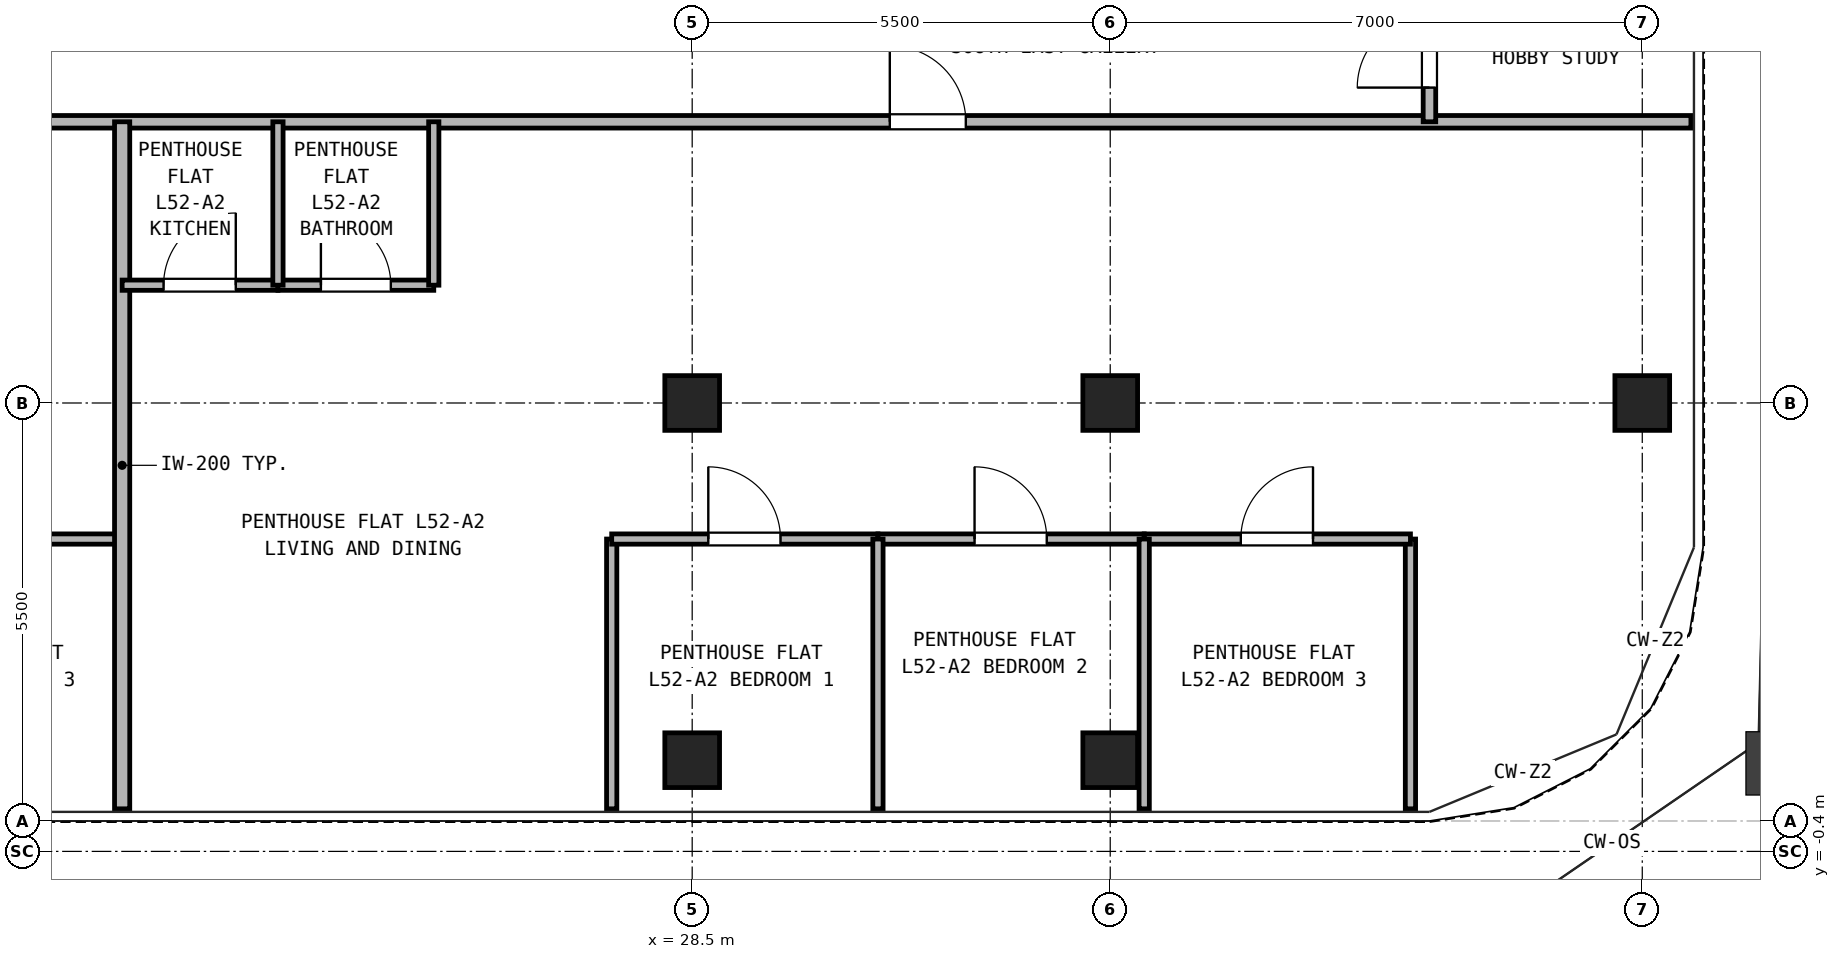
"""IFC4 building model, lengths in metres.
Left out: names, types, materials, properties, quantities, classifications, styles, units other than length and angle.
Written with IfcOpenShell. Run it as: python <this file> out.ifc"""

import sys

from ifc_helpers import new_model, si_unit, direction, frame, frame_2d, origin, origin_2d, place, context, subcontext, project, spatial, rectangle, hollow_rectangle, extrude, source, transform, mapped, element, fill, save


model = new_model("IFC4")
c1 = context("Model", 3, precision=1e-05, world=origin(), true_north=direction((0.0, 1.0)))
c2 = subcontext(c1, "Body", "Model", "MODEL_VIEW")
j1 = project(units=[si_unit("LENGTHUNIT", "METRE"), si_unit("PLANEANGLEUNIT", "RADIAN")], contexts=[c1])
p1 = place(None, origin())
s1 = spatial("IfcSite", under=j1, at=p1, CompositionType="ELEMENT")
p2 = place(p1, origin())
s2 = spatial("IfcBuilding", under=s1, at=p2, CompositionType="ELEMENT")
p3 = place(p2, frame((0.0, 0.0, 184.9)))
s3 = spatial("IfcBuildingStorey", under=s2, at=p3, CompositionType="ELEMENT", Elevation=184.9)
m1 = source(origin(), c2, "Body", "SweptSolid", [
    extrude(hollow_rectangle(XDim=0.72, YDim=0.72, WallThickness=0.04, at=origin_2d()), origin(), (0.0, 0.0, 1.0), 2.84),
])
for number, where, z_axis, x_axis in (
    (1, (28.5, 0.8, 0.0), (0.0, 0.0, 1.0), (1.0, 0.0, 0.0)),
    (2, (34.0, 0.8, 0.0), (0.0, 0.0, 1.0), (1.0, 0.0, 0.0)),
    (3, (41.0, 5.5, 0.0), (0.0, 0.0, 1.0), (1.0, 0.0, 0.0)),
    (4, (28.5, 5.5, 0.0), (0.0, 0.0, 1.0), (1.0, 0.0, 0.0)),
    (5, (34.0, 5.5, 0.0), (0.0, 0.0, 1.0), (1.0, 0.0, 0.0)),
):
    element("IfcColumn", number, at=place(p3, frame(where, z_axis=z_axis, x_axis=x_axis)), inside=s3, PredefinedType="COLUMN", context=c2, shape_type="MappedRepresentation", body=[
        mapped(m1, transform((0.0, 0.0, 0.0), x_axis=(1.0, 0.0, 0.0), y_axis=(0.0, 1.0, 0.0), z_axis=(0.0, 0.0, 1.0), scale=1.0)),
    ])
p4 = place(p3, frame((0.16, 9.2, 0.0), z_axis=(0.0, 0.0, 1.0), x_axis=(1.0, 0.0, 0.0)))
e6 = element("IfcWall", 6, at=p4, inside=s3, PredefinedType="PARTITIONING", context=c2, shape_type="SweptSolid", body=[
    extrude(rectangle(XDim=41.48, YDim=0.165, at=frame_2d((20.74, 0.0))), origin(), (0.0, 0.0, 1.0), 2.84),
])
p5 = place(p4, frame((15.565, 0.0, 0.0)))
e7 = element("IfcOpeningElement", 7, at=p5, cuts=e6, PredefinedType="OPENING", context=c2, shape_type="SweptSolid", body=[
    extrude(rectangle(XDim=1.0, YDim=2.15, at=frame_2d((0.5, 1.075))), frame((0.0, 0.093, 0.0), z_axis=(0.0, -1.0, 0.0), x_axis=(1.0, 0.0, 0.0)), (0.0, 0.0, 1.0), 0.185),
])
p6 = place(p4, frame((30.94, 0.0, 0.0)))
e8 = element("IfcOpeningElement", 8, at=p6, cuts=e6, PredefinedType="OPENING", context=c2, shape_type="SweptSolid", body=[
    extrude(rectangle(XDim=1.0, YDim=2.15, at=frame_2d((0.5, 1.075))), frame((0.0, 0.093, 0.0), z_axis=(0.0, -1.0, 0.0), x_axis=(1.0, 0.0, 0.0)), (0.0, 0.0, 1.0), 0.185),
])
p7 = place(p3, frame((38.2, 9.2, 0.0), z_axis=(0.0, 0.0, 1.0), x_axis=(0.0, 1.0, 0.0)))
e9 = element("IfcWall", 9, at=p7, inside=s3, PredefinedType="PARTITIONING", context=c2, shape_type="SweptSolid", body=[
    extrude(rectangle(XDim=2.0, YDim=0.165, at=frame_2d((1.0, 0.0))), origin(), (0.0, 0.0, 1.0), 2.84),
])
p8 = place(p7, frame((0.45, 0.0, 0.0)))
e10 = element("IfcOpeningElement", 10, at=p8, cuts=e9, PredefinedType="OPENING", context=c2, shape_type="SweptSolid", body=[
    extrude(rectangle(XDim=0.95, YDim=2.15, at=frame_2d((0.475, 1.075))), frame((0.0, 0.093, 0.0), z_axis=(0.0, -1.0, 0.0), x_axis=(1.0, 0.0, 0.0)), (0.0, 0.0, 1.0), 0.185),
])
p9 = place(p3, frame((17.456, 3.71, 0.0), z_axis=(0.0, 0.0, 1.0), x_axis=(1.0, 0.0, 0.0)))
e11 = element("IfcWall", 11, at=p9, inside=s3, PredefinedType="PARTITIONING", context=c2, shape_type="SweptSolid", body=[
    extrude(rectangle(XDim=3.544, YDim=0.135, at=frame_2d((1.772, 0.0))), origin(), (0.0, 0.0, 1.0), 2.84),
])
p10 = place(p9, frame((1.292, 0.0, 0.0)))
e12 = element("IfcOpeningElement", 12, at=p10, cuts=e11, PredefinedType="OPENING", context=c2, shape_type="SweptSolid", body=[
    extrude(rectangle(XDim=0.95, YDim=2.15, at=frame_2d((0.475, 1.075))), frame((0.0, 0.077, 0.0), z_axis=(0.0, -1.0, 0.0), x_axis=(1.0, 0.0, 0.0)), (0.0, 0.0, 1.0), 0.155),
])
p11 = place(p3, frame((21.0, 0.16, 0.0), z_axis=(0.0, 0.0, 1.0), x_axis=(0.0, 1.0, 0.0)))
e13 = element("IfcWall", 13, at=p11, inside=s3, PredefinedType="PARTITIONING", context=c2, shape_type="SweptSolid", body=[
    extrude(rectangle(XDim=9.04, YDim=0.2, at=frame_2d((4.52, 0.0))), origin(), (0.0, 0.0, 1.0), 2.84),
])
p12 = place(p3, frame((21.0, 7.05, 0.0), z_axis=(0.0, 0.0, 1.0), x_axis=(1.0, 0.0, 0.0)))
e14 = element("IfcWall", 14, at=p12, inside=s3, PredefinedType="PARTITIONING", context=c2, shape_type="SweptSolid", body=[
    extrude(rectangle(XDim=2.05, YDim=0.135, at=frame_2d((1.025, 0.0))), origin(), (0.0, 0.0, 1.0), 2.84),
])
p13 = place(p12, frame((0.545, 0.0, 0.0)))
e15 = element("IfcOpeningElement", 15, at=p13, cuts=e14, PredefinedType="OPENING", context=c2, shape_type="SweptSolid", body=[
    extrude(rectangle(XDim=0.95, YDim=2.15, at=frame_2d((0.475, 1.075))), frame((0.0, 0.077, 0.0), z_axis=(0.0, -1.0, 0.0), x_axis=(1.0, 0.0, 0.0)), (0.0, 0.0, 1.0), 0.155),
])
p14 = place(p3, frame((23.05, 7.05, 0.0), z_axis=(0.0, 0.0, 1.0), x_axis=(1.0, 0.0, 0.0)))
e16 = element("IfcWall", 16, at=p14, inside=s3, PredefinedType="PARTITIONING", context=c2, shape_type="SweptSolid", body=[
    extrude(rectangle(XDim=2.05, YDim=0.135, at=frame_2d((1.025, 0.0))), origin(), (0.0, 0.0, 1.0), 2.84),
])
p15 = place(p14, frame((0.565, 0.0, 0.0)))
e17 = element("IfcOpeningElement", 17, at=p15, cuts=e16, PredefinedType="OPENING", context=c2, shape_type="SweptSolid", body=[
    extrude(rectangle(XDim=0.92, YDim=2.1, at=frame_2d((0.46, 1.05))), frame((0.0, 0.077, 0.0), z_axis=(0.0, -1.0, 0.0), x_axis=(1.0, 0.0, 0.0)), (0.0, 0.0, 1.0), 0.155),
])
for number, where, z_axis, x_axis in (
    (18, (23.05, 7.05, 0.0), (0.0, 0.0, 1.0), (0.0, 1.0, 0.0)),
    (19, (25.1, 7.05, 0.0), (0.0, 0.0, 1.0), (0.0, 1.0, 0.0)),
):
    element("IfcWall", number, at=place(p3, frame(where, z_axis=z_axis, x_axis=x_axis)), inside=s3, PredefinedType="PARTITIONING", context=c2, shape_type="SweptSolid", body=[
        extrude(rectangle(XDim=2.15, YDim=0.135, at=frame_2d((1.075, 0.0))), origin(), (0.0, 0.0, 1.0), 2.84),
    ])
for number, where, z_axis, x_axis in (
    (20, (27.441, 0.16, 0.0), (0.0, 0.0, 1.0), (0.0, 1.0, 0.0)),
    (21, (37.95, 0.16, 0.0), (0.0, 0.0, 1.0), (0.0, 1.0, 0.0)),
):
    element("IfcWall", number, at=place(p3, frame(where, z_axis=z_axis, x_axis=x_axis)), inside=s3, PredefinedType="PARTITIONING", context=c2, shape_type="SweptSolid", body=[
        extrude(rectangle(XDim=3.55, YDim=0.135, at=frame_2d((1.775, 0.0))), origin(), (0.0, 0.0, 1.0), 2.84),
    ])
p16 = place(p3, frame((27.441, 3.71, 0.0), z_axis=(0.0, 0.0, 1.0), x_axis=(1.0, 0.0, 0.0)))
e22 = element("IfcWall", 22, at=p16, inside=s3, PredefinedType="PARTITIONING", context=c2, shape_type="SweptSolid", body=[
    extrude(rectangle(XDim=3.503, YDim=0.135, at=frame_2d((1.751, 0.0))), origin(), (0.0, 0.0, 1.0), 2.84),
])
p17 = place(p16, frame((1.271, 0.0, 0.0)))
e23 = element("IfcOpeningElement", 23, at=p17, cuts=e22, PredefinedType="OPENING", context=c2, shape_type="SweptSolid", body=[
    extrude(rectangle(XDim=0.95, YDim=2.15, at=frame_2d((0.475, 1.075))), frame((0.0, 0.077, 0.0), z_axis=(0.0, -1.0, 0.0), x_axis=(1.0, 0.0, 0.0)), (0.0, 0.0, 1.0), 0.155),
])
p18 = place(p3, frame((30.944, 3.71, 0.0), z_axis=(0.0, 0.0, 1.0), x_axis=(1.0, 0.0, 0.0)))
e24 = element("IfcWall", 24, at=p18, inside=s3, PredefinedType="PARTITIONING", context=c2, shape_type="SweptSolid", body=[
    extrude(rectangle(XDim=3.503, YDim=0.135, at=frame_2d((1.751, 0.0))), origin(), (0.0, 0.0, 1.0), 2.84),
])
p19 = place(p18, frame((1.271, 0.0, 0.0)))
e25 = element("IfcOpeningElement", 25, at=p19, cuts=e24, PredefinedType="OPENING", context=c2, shape_type="SweptSolid", body=[
    extrude(rectangle(XDim=0.95, YDim=2.15, at=frame_2d((0.475, 1.075))), frame((0.0, 0.077, 0.0), z_axis=(0.0, -1.0, 0.0), x_axis=(1.0, 0.0, 0.0)), (0.0, 0.0, 1.0), 0.155),
])
p20 = place(p3, frame((30.944, 0.16, 0.0), z_axis=(0.0, 0.0, 1.0), x_axis=(0.0, 1.0, 0.0)))
e26 = element("IfcWall", 26, at=p20, inside=s3, PredefinedType="PARTITIONING", context=c2, shape_type="SweptSolid", body=[
    extrude(rectangle(XDim=3.55, YDim=0.135, at=frame_2d((1.775, 0.0))), origin(), (0.0, 0.0, 1.0), 2.84),
])
p21 = place(p3, frame((34.447, 3.71, 0.0), z_axis=(0.0, 0.0, 1.0), x_axis=(1.0, 0.0, 0.0)))
e27 = element("IfcWall", 27, at=p21, inside=s3, PredefinedType="PARTITIONING", context=c2, shape_type="SweptSolid", body=[
    extrude(rectangle(XDim=3.503, YDim=0.135, at=frame_2d((1.751, 0.0))), origin(), (0.0, 0.0, 1.0), 2.84),
])
p22 = place(p21, frame((1.271, 0.0, 0.0)))
e28 = element("IfcOpeningElement", 28, at=p22, cuts=e27, PredefinedType="OPENING", context=c2, shape_type="SweptSolid", body=[
    extrude(rectangle(XDim=0.95, YDim=2.15, at=frame_2d((0.475, 1.075))), frame((0.0, 0.077, 0.0), z_axis=(0.0, -1.0, 0.0), x_axis=(1.0, 0.0, 0.0)), (0.0, 0.0, 1.0), 0.155),
])
p23 = place(p3, frame((34.447, 0.16, 0.0), z_axis=(0.0, 0.0, 1.0), x_axis=(0.0, 1.0, 0.0)))
e29 = element("IfcWall", 29, at=p23, inside=s3, PredefinedType="PARTITIONING", context=c2, shape_type="SweptSolid", body=[
    extrude(rectangle(XDim=3.55, YDim=0.135, at=frame_2d((1.775, 0.0))), origin(), (0.0, 0.0, 1.0), 2.84),
])
p24 = place(p13, origin())
e30 = element("IfcDoor", 30, at=p24, inside=s3, OperationType="SINGLE_SWING_RIGHT", PredefinedType="DOOR", context=c2, shape_type="SweptSolid", body=[
    extrude(rectangle(XDim=0.95, YDim=2.15, at=frame_2d((0.475, 1.075))), frame((0.0, 0.025, 0.0), z_axis=(0.0, -1.0, 0.0), x_axis=(1.0, 0.0, 0.0)), (0.0, 0.0, 1.0), 0.05),
])
fill(e15, e30)
p25 = place(p15, origin())
e31 = element("IfcDoor", 31, at=p25, inside=s3, OperationType="SINGLE_SWING_LEFT", PredefinedType="DOOR", context=c2, shape_type="SweptSolid", body=[
    extrude(rectangle(XDim=0.92, YDim=2.1, at=frame_2d((0.46, 1.05))), frame((0.0, 0.025, 0.0), z_axis=(0.0, -1.0, 0.0), x_axis=(1.0, 0.0, 0.0)), (0.0, 0.0, 1.0), 0.05),
])
fill(e17, e31)
p26 = place(p17, frame((0.95, 0.0, 0.0), z_axis=(0.0, 0.0, 1.0), x_axis=(-1.0, 0.0, 0.0)))
e32 = element("IfcDoor", 32, at=p26, inside=s3, OperationType="SINGLE_SWING_LEFT", PredefinedType="DOOR", context=c2, shape_type="SweptSolid", body=[
    extrude(rectangle(XDim=0.95, YDim=2.15, at=frame_2d((0.475, 1.075))), frame((0.0, 0.025, 0.0), z_axis=(0.0, -1.0, 0.0), x_axis=(1.0, 0.0, 0.0)), (0.0, 0.0, 1.0), 0.05),
])
fill(e23, e32)
p27 = place(p19, frame((0.95, 0.0, 0.0), z_axis=(0.0, 0.0, 1.0), x_axis=(-1.0, 0.0, 0.0)))
e33 = element("IfcDoor", 33, at=p27, inside=s3, OperationType="SINGLE_SWING_LEFT", PredefinedType="DOOR", context=c2, shape_type="SweptSolid", body=[
    extrude(rectangle(XDim=0.95, YDim=2.15, at=frame_2d((0.475, 1.075))), frame((0.0, 0.025, 0.0), z_axis=(0.0, -1.0, 0.0), x_axis=(1.0, 0.0, 0.0)), (0.0, 0.0, 1.0), 0.05),
])
fill(e25, e33)
p28 = place(p22, frame((0.95, 0.0, 0.0), z_axis=(0.0, 0.0, 1.0), x_axis=(-1.0, 0.0, 0.0)))
e34 = element("IfcDoor", 34, at=p28, inside=s3, OperationType="SINGLE_SWING_RIGHT", PredefinedType="DOOR", context=c2, shape_type="SweptSolid", body=[
    extrude(rectangle(XDim=0.95, YDim=2.15, at=frame_2d((0.475, 1.075))), frame((0.0, 0.025, 0.0), z_axis=(0.0, -1.0, 0.0), x_axis=(1.0, 0.0, 0.0)), (0.0, 0.0, 1.0), 0.05),
])
fill(e28, e34)
p29 = place(p6, frame((1.0, 0.0, 0.0), z_axis=(0.0, 0.0, 1.0), x_axis=(-1.0, 0.0, 0.0)))
e35 = element("IfcDoor", 35, at=p29, inside=s3, OperationType="SINGLE_SWING_LEFT", PredefinedType="DOOR", context=c2, shape_type="SweptSolid", body=[
    extrude(rectangle(XDim=1.0, YDim=2.15, at=frame_2d((0.5, 1.075))), frame((0.0, 0.025, 0.0), z_axis=(0.0, -1.0, 0.0), x_axis=(1.0, 0.0, 0.0)), (0.0, 0.0, 1.0), 0.05),
])
fill(e8, e35)
p30 = place(p8, origin())
e36 = element("IfcDoor", 36, at=p30, inside=s3, OperationType="SINGLE_SWING_LEFT", PredefinedType="DOOR", context=c2, shape_type="SweptSolid", body=[
    extrude(rectangle(XDim=0.95, YDim=2.15, at=frame_2d((0.475, 1.075))), frame((0.0, 0.025, 0.0), z_axis=(0.0, -1.0, 0.0), x_axis=(1.0, 0.0, 0.0)), (0.0, 0.0, 1.0), 0.05),
])
fill(e10, e36)
save(model, sys.argv[1])
